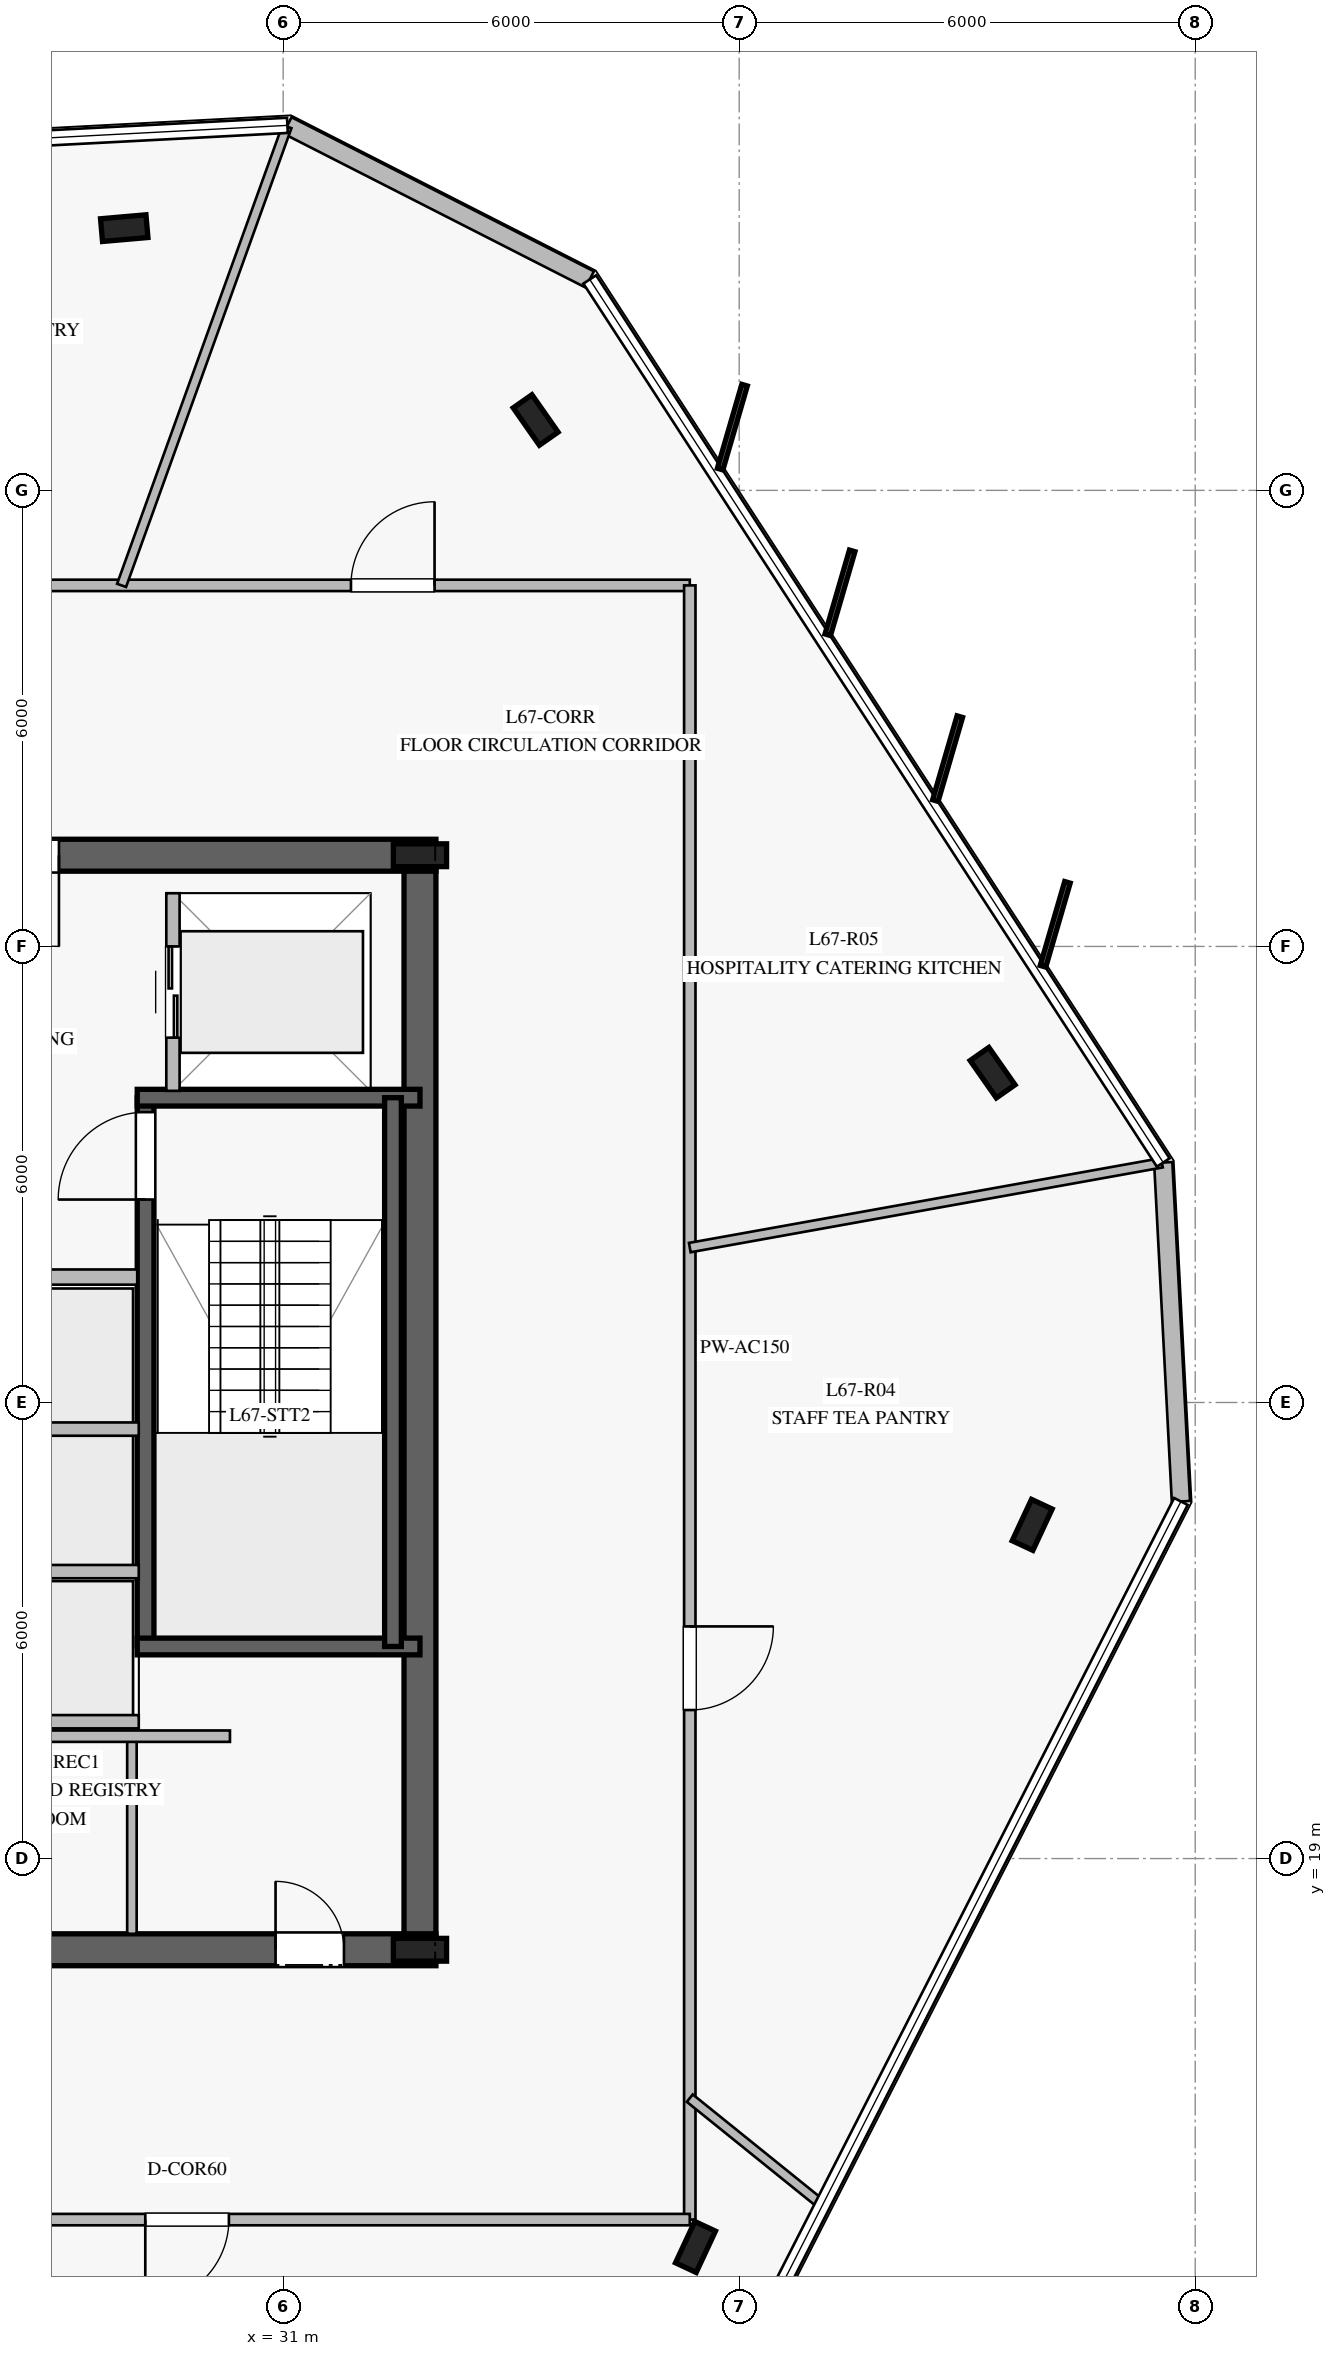
"""IFC4 building model, lengths in metres.
Left out: names, types, materials, properties, quantities, classifications, styles, units other than length and angle.
Written with IfcOpenShell. Run it as: python <this file> out.ifc"""

import sys

from ifc_helpers import new_model, si_unit, direction, frame, frame_2d, origin, origin_2d, place, context, subcontext, project, spatial, rectangle, i_section, extrude, element, fill, save


model = new_model("IFC4")
c1 = context("Model", 3, precision=1e-05, world=origin(), true_north=direction((0.0, 1.0)))
c2 = subcontext(c1, "Body", "Model", "MODEL_VIEW")
j1 = project(units=[si_unit("LENGTHUNIT", "METRE"), si_unit("PLANEANGLEUNIT", "RADIAN")], contexts=[c1])
p1 = place(None, origin())
s1 = spatial("IfcSite", under=j1, at=p1, CompositionType="ELEMENT")
p2 = place(p1, origin())
s2 = spatial("IfcBuilding", under=s1, at=p2, CompositionType="ELEMENT")
p3 = place(p2, frame((0.0, 0.0, 278.2)))
s3 = spatial("IfcBuildingStorey", under=s2, at=p3, CompositionType="ELEMENT", Elevation=278.2)
p4 = place(p3, frame((16.99, 17.8, 0.0), z_axis=(0.0, 0.0, 1.0), x_axis=(1.0, 0.0, 0.0)))
e1 = element("IfcWall", 1, at=p4, inside=s3, PredefinedType="SHEAR", context=c2, shape_type="SweptSolid", body=[
    extrude(rectangle(XDim=16.02, YDim=0.42, at=frame_2d((8.01, 0.0))), origin(), (0.0, 0.0, 1.0), 3.78),
])
p5 = place(p4, frame((4.96, 0.0, 0.0)))
e2 = element("IfcOpeningElement", 2, at=p5, cuts=e1, PredefinedType="OPENING", context=c2, shape_type="SweptSolid", body=[
    extrude(rectangle(XDim=1.2, YDim=2.25, at=frame_2d((0.6, 1.125))), frame((0.0, 0.22, 0.0), z_axis=(0.0, -1.0, 0.0), x_axis=(1.0, 0.0, 0.0)), (0.0, 0.0, 1.0), 0.44),
])
p6 = place(p4, frame((13.91, 0.0, 0.0)))
e3 = element("IfcOpeningElement", 3, at=p6, cuts=e1, PredefinedType="OPENING", context=c2, shape_type="SweptSolid", body=[
    extrude(rectangle(XDim=0.9, YDim=2.1, at=frame_2d((0.45, 1.05))), frame((0.0, 0.22, 0.0), z_axis=(0.0, -1.0, 0.0), x_axis=(1.0, 0.0, 0.0)), (0.0, 0.0, 1.0), 0.44),
])
p7 = place(p4, frame((9.16, 0.0, 0.0)))
e4 = element("IfcOpeningElement", 4, at=p7, cuts=e1, PredefinedType="OPENING", context=c2, shape_type="SweptSolid", body=[
    extrude(rectangle(XDim=1.1, YDim=2.2, at=frame_2d((0.55, 1.1))), frame((0.0, 0.22, 0.0), z_axis=(0.0, -1.0, 0.0), x_axis=(1.0, 0.0, 0.0)), (0.0, 0.0, 1.0), 0.44),
])
p8 = place(p3, frame((33.01, 32.2, 0.0), z_axis=(0.0, 0.0, 1.0), x_axis=(-1.0, 0.0, 0.0)))
e5 = element("IfcWall", 5, at=p8, inside=s3, PredefinedType="SHEAR", context=c2, shape_type="SweptSolid", body=[
    extrude(rectangle(XDim=16.02, YDim=0.42, at=frame_2d((8.01, 0.0))), origin(), (0.0, 0.0, 1.0), 3.78),
])
p9 = place(p8, frame((4.96, 0.0, 0.0)))
e6 = element("IfcOpeningElement", 6, at=p9, cuts=e5, PredefinedType="OPENING", context=c2, shape_type="SweptSolid", body=[
    extrude(rectangle(XDim=1.2, YDim=2.25, at=frame_2d((0.6, 1.125))), frame((0.0, 0.22, 0.0), z_axis=(0.0, -1.0, 0.0), x_axis=(1.0, 0.0, 0.0)), (0.0, 0.0, 1.0), 0.44),
])
p10 = place(p8, frame((9.785, 0.0, 0.0)))
e7 = element("IfcOpeningElement", 7, at=p10, cuts=e5, PredefinedType="OPENING", context=c2, shape_type="SweptSolid", body=[
    extrude(rectangle(XDim=1.1, YDim=2.2, at=frame_2d((0.55, 1.1))), frame((0.0, 0.22, 0.0), z_axis=(0.0, -1.0, 0.0), x_axis=(1.0, 0.0, 0.0)), (0.0, 0.0, 1.0), 0.44),
])
p11 = place(p3, frame((32.8, 18.01, 0.0), z_axis=(0.0, 0.0, 1.0), x_axis=(0.0, 1.0, 0.0)))
e8 = element("IfcWall", 8, at=p11, inside=s3, PredefinedType="SHEAR", context=c2, shape_type="SweptSolid", body=[
    extrude(rectangle(XDim=13.98, YDim=0.42, at=frame_2d((6.99, 0.0))), origin(), (0.0, 0.0, 1.0), 3.78),
])
for number, where, z_axis, x_axis in (
    (9, (32.8, 17.8, 0.0), (0.0, 0.0, 1.0), (1.0, 0.0, 0.0)),
    (10, (32.8, 32.2, 0.0), (0.0, 0.0, 1.0), (1.0, 0.0, 0.0)),
):
    element("IfcColumn", number, at=place(p3, frame(where, z_axis=z_axis, x_axis=x_axis)), inside=s3, PredefinedType="COLUMN", context=c2, shape_type="SweptSolid", body=[
        extrude(i_section(OverallWidth=0.3, OverallDepth=0.7, WebThickness=0.017, FlangeThickness=0.032, at=origin_2d()), origin(), (0.0, 0.0, 1.0), 4.0),
    ])
p12 = place(p3, frame((29.19, 21.79, 0.0), z_axis=(0.0, 0.0, 1.0), x_axis=(0.0, 1.0, 0.0)))
e11 = element("IfcWall", 11, at=p12, inside=s3, PredefinedType="SOLIDWALL", context=c2, shape_type="SweptSolid", body=[
    extrude(rectangle(XDim=7.22, YDim=0.22, at=frame_2d((3.61, 0.0))), origin(), (0.0, 0.0, 1.0), 3.78),
])
p13 = place(p12, frame((5.88, 0.0, 0.0)))
e12 = element("IfcOpeningElement", 12, at=p13, cuts=e11, PredefinedType="OPENING", context=c2, shape_type="SweptSolid", body=[
    extrude(rectangle(XDim=1.15, YDim=2.2, at=frame_2d((0.575, 1.1))), frame((0.0, 0.12, 0.0), z_axis=(0.0, -1.0, 0.0), x_axis=(1.0, 0.0, 0.0)), (0.0, 0.0, 1.0), 0.24),
])
for number, where, z_axis, x_axis in (
    (13, (29.08, 21.79, 0.0), (0.0, 0.0, 1.0), (1.0, 0.0, 0.0)),
    (14, (29.08, 29.01, 0.0), (0.0, 0.0, 1.0), (1.0, 0.0, 0.0)),
):
    element("IfcWall", number, at=place(p3, frame(where, z_axis=z_axis, x_axis=x_axis)), inside=s3, PredefinedType="SOLIDWALL", context=c2, shape_type="SweptSolid", body=[
        extrude(rectangle(XDim=3.72, YDim=0.22, at=frame_2d((1.86, 0.0))), origin(), (0.0, 0.0, 1.0), 3.78),
    ])
p14 = place(p3, frame((32.445, 29.01, 0.0), z_axis=(0.0, 0.0, 1.0), x_axis=(0.0, -1.0, 0.0)))
e15 = element("IfcWall", 15, at=p14, inside=s3, PredefinedType="SOLIDWALL", context=c2, shape_type="SweptSolid", body=[
    extrude(rectangle(XDim=7.22, YDim=0.22, at=frame_2d((3.61, 0.0))), origin(), (0.0, 0.0, 1.0), 3.78),
])
for number, where, z_axis, x_axis in (
    (16, (28.909, 40.45, 0.0), (0.0, 0.0, 1.0), (0.996, 0.087, 0.0)),
    (17, (36.425, 13.89, 0.0), (0.0, 0.0, 1.0), (0.423, 0.906, 0.0)),
    (18, (40.855, 23.39, 0.0), (0.0, 0.0, 1.0), (0.423, 0.906, 0.0)),
    (19, (40.334, 29.339, 0.0), (0.0, 0.0, 1.0), (-0.574, 0.819, 0.0)),
    (20, (34.322, 37.926, 0.0), (0.0, 0.0, 1.0), (-0.574, 0.819, 0.0)),
):
    element("IfcColumn", number, at=place(p3, frame(where, z_axis=z_axis, x_axis=x_axis)), inside=s3, PredefinedType="COLUMN", context=c2, shape_type="SweptSolid", body=[
        extrude(i_section(OverallWidth=0.3, OverallDepth=0.6, WebThickness=0.015, FlangeThickness=0.03, at=origin_2d()), origin(), (0.0, 0.0, 1.0), 4.0),
    ])
p15 = place(p3, frame((42.812, 23.698, 0.0), z_axis=(0.0, 0.0, 1.0), x_axis=(-0.052162791258, 0.998638594892, 0.0)))
e21 = element("IfcWall", 21, at=p15, inside=s3, PredefinedType="STANDARD", context=c2, shape_type="SweptSolid", body=[
    extrude(rectangle(XDim=4.465, YDim=0.24, at=frame_2d((2.232, 0.0))), origin(), (0.0, 0.0, 1.0), 3.78),
])
p16 = place(p3, frame((35.034, 39.775, 0.0), z_axis=(0.0, 0.0, 1.0), x_axis=(-0.890988997793, 0.454024895586, 0.0)))
e22 = element("IfcWall", 22, at=p16, inside=s3, PredefinedType="STANDARD", context=c2, shape_type="SweptSolid", body=[
    extrude(rectangle(XDim=4.465, YDim=0.24, at=frame_2d((2.232, 0.0))), origin(), (0.0, 0.0, 1.0), 3.78),
])
p17 = place(p3, frame((25.7, 26.65, 0.0), z_axis=(0.0, 0.0, 1.0), x_axis=(1.0, 0.0, 0.0)))
e23 = element("IfcWall", 23, at=p17, inside=s3, PredefinedType="PARTITIONING", context=c2, shape_type="SweptSolid", body=[
    extrude(rectangle(XDim=3.38, YDim=0.2, at=frame_2d((1.69, 0.0))), origin(), (0.0, 0.0, 1.0), 3.78),
])
p18 = place(p3, frame((29.01, 18.01, 0.0), z_axis=(0.0, 0.0, 1.0), x_axis=(0.0, 1.0, 0.0)))
e24 = element("IfcWall", 24, at=p18, inside=s3, PredefinedType="PARTITIONING", context=c2, shape_type="SweptSolid", body=[
    extrude(rectangle(XDim=2.54, YDim=0.125, at=frame_2d((1.27, 0.0))), origin(), (0.0, 0.0, 1.0), 3.78),
])
p19 = place(p3, frame((24.4, 20.61, 0.0), z_axis=(0.0, 0.0, 1.0), x_axis=(1.0, 0.0, 0.0)))
e25 = element("IfcWall", 25, at=p19, inside=s3, PredefinedType="PARTITIONING", context=c2, shape_type="SweptSolid", body=[
    extrude(rectangle(XDim=5.9, YDim=0.15, at=frame_2d((2.95, 0.0))), origin(), (0.0, 0.0, 1.0), 3.78),
])
for number, where, z_axis, x_axis in (
    (26, (26.75, 20.8, 0.0), (0.0, 0.0, 1.0), (1.0, 0.0, 0.0)),
    (27, (26.75, 22.775, 0.0), (0.0, 0.0, 1.0), (1.0, 0.0, 0.0)),
    (28, (26.75, 24.65, 0.0), (0.0, 0.0, 1.0), (1.0, 0.0, 0.0)),
):
    element("IfcWall", number, at=place(p3, frame(where, z_axis=z_axis, x_axis=x_axis)), inside=s3, PredefinedType="PARTITIONING", context=c2, shape_type="SweptSolid", body=[
        extrude(rectangle(XDim=2.35, YDim=0.175, at=frame_2d((1.175, 0.0))), origin(), (0.0, 0.0, 1.0), 3.78),
    ])
p20 = place(p3, frame((29.55, 29.1, 0.0), z_axis=(0.0, 0.0, 1.0), x_axis=(0.0, 1.0, 0.0)))
e29 = element("IfcWall", 29, at=p20, inside=s3, PredefinedType="PARTITIONING", context=c2, shape_type="SweptSolid", body=[
    extrude(rectangle(XDim=2.6, YDim=0.175, at=frame_2d((1.3, 0.0))), origin(), (0.0, 0.0, 1.0), 3.78),
])
p21 = place(p20, frame((0.7, 0.0, 0.0)))
e30 = element("IfcOpeningElement", 30, at=p21, cuts=e29, PredefinedType="OPENING", context=c2, shape_type="SweptSolid", body=[
    extrude(rectangle(XDim=1.2, YDim=2.2, at=frame_2d((0.6, 1.1))), frame((0.0, 0.098, 0.0), z_axis=(0.0, -1.0, 0.0), x_axis=(1.0, 0.0, 0.0)), (0.0, 0.0, 1.0), 0.195),
])
p22 = place(p3, frame((13.65, 35.75, 0.0), z_axis=(0.0, 0.0, 1.0), x_axis=(1.0, 0.0, 0.0)))
e31 = element("IfcWall", 31, at=p22, inside=s3, PredefinedType="PARTITIONING", context=c2, shape_type="SweptSolid", body=[
    extrude(rectangle(XDim=22.7, YDim=0.15, at=frame_2d((11.35, 0.0))), origin(), (0.0, 0.0, 1.0), 3.05),
])
p23 = place(p22, frame((18.242, 0.0, 0.0)))
e32 = element("IfcOpeningElement", 32, at=p23, cuts=e31, PredefinedType="OPENING", context=c2, shape_type="SweptSolid", body=[
    extrude(rectangle(XDim=1.1, YDim=2.2, at=frame_2d((0.55, 1.1))), frame((0.0, 0.085, 0.0), z_axis=(0.0, -1.0, 0.0), x_axis=(1.0, 0.0, 0.0)), (0.0, 0.0, 1.0), 0.17),
])
p24 = place(p22, frame((11.312, 0.0, 0.0)))
e33 = element("IfcOpeningElement", 33, at=p24, cuts=e31, PredefinedType="OPENING", context=c2, shape_type="SweptSolid", body=[
    extrude(rectangle(XDim=1.1, YDim=2.2, at=frame_2d((0.55, 1.1))), frame((0.0, 0.085, 0.0), z_axis=(0.0, -1.0, 0.0), x_axis=(1.0, 0.0, 0.0)), (0.0, 0.0, 1.0), 0.17),
])
p25 = place(p22, frame((3.871, 0.0, 0.0)))
e34 = element("IfcOpeningElement", 34, at=p25, cuts=e31, PredefinedType="OPENING", context=c2, shape_type="SweptSolid", body=[
    extrude(rectangle(XDim=1.1, YDim=2.2, at=frame_2d((0.55, 1.1))), frame((0.0, 0.085, 0.0), z_axis=(0.0, -1.0, 0.0), x_axis=(1.0, 0.0, 0.0)), (0.0, 0.0, 1.0), 0.17),
])
p26 = place(p3, frame((36.35, 35.75, 0.0), z_axis=(0.0, 0.0, 1.0), x_axis=(0.0, -1.0, 0.0)))
e35 = element("IfcWall", 35, at=p26, inside=s3, PredefinedType="PARTITIONING", context=c2, shape_type="SweptSolid", body=[
    extrude(rectangle(XDim=21.5, YDim=0.15, at=frame_2d((10.75, 0.0))), origin(), (0.0, 0.0, 1.0), 3.28),
])
p27 = place(p26, frame((13.696, 0.0, 0.0)))
e36 = element("IfcOpeningElement", 36, at=p27, cuts=e35, PredefinedType="OPENING", context=c2, shape_type="SweptSolid", body=[
    extrude(rectangle(XDim=1.1, YDim=2.2, at=frame_2d((0.55, 1.1))), frame((0.0, 0.085, 0.0), z_axis=(0.0, -1.0, 0.0), x_axis=(1.0, 0.0, 0.0)), (0.0, 0.0, 1.0), 0.17),
])
p28 = place(p3, frame((36.35, 14.25, 0.0), z_axis=(0.0, 0.0, 1.0), x_axis=(-1.0, 0.0, 0.0)))
e37 = element("IfcWall", 37, at=p28, inside=s3, PredefinedType="PARTITIONING", context=c2, shape_type="SweptSolid", body=[
    extrude(rectangle(XDim=22.7, YDim=0.15, at=frame_2d((11.35, 0.0))), origin(), (0.0, 0.0, 1.0), 3.05),
])
p29 = place(p28, frame((17.137, 0.0, 0.0)))
e38 = element("IfcOpeningElement", 38, at=p29, cuts=e37, PredefinedType="OPENING", context=c2, shape_type="SweptSolid", body=[
    extrude(rectangle(XDim=1.1, YDim=2.2, at=frame_2d((0.55, 1.1))), frame((0.0, 0.085, 0.0), z_axis=(0.0, -1.0, 0.0), x_axis=(1.0, 0.0, 0.0)), (0.0, 0.0, 1.0), 0.17),
])
p30 = place(p28, frame((6.064, 0.0, 0.0)))
e39 = element("IfcOpeningElement", 39, at=p30, cuts=e37, PredefinedType="OPENING", context=c2, shape_type="SweptSolid", body=[
    extrude(rectangle(XDim=1.1, YDim=2.2, at=frame_2d((0.55, 1.1))), frame((0.0, 0.085, 0.0), z_axis=(0.0, -1.0, 0.0), x_axis=(1.0, 0.0, 0.0)), (0.0, 0.0, 1.0), 0.17),
])
p31 = place(p3, frame((36.35, 15.848, 0.0), z_axis=(0.0, 0.0, 1.0), x_axis=(0.778316237, -0.627872467323, 0.0)))
e40 = element("IfcWall", 40, at=p31, inside=s3, PredefinedType="PARTITIONING", context=c2, shape_type="SweptSolid", body=[
    extrude(rectangle(XDim=2.227, YDim=0.125, at=frame_2d((1.113, 0.0))), origin(), (0.0, 0.0, 1.0), 3.28),
])
p32 = place(p3, frame((36.35, 27.038, 0.0), z_axis=(0.0, 0.0, 1.0), x_axis=(0.98424342704, 0.1768187669, 0.0)))
e41 = element("IfcWall", 41, at=p32, inside=s3, PredefinedType="PARTITIONING", context=c2, shape_type="SweptSolid", body=[
    extrude(rectangle(XDim=6.311, YDim=0.125, at=frame_2d((3.156, 0.0))), origin(), (0.0, 0.0, 1.0), 3.28),
])
p33 = place(p3, frame((28.874, 35.75, 0.0), z_axis=(0.0, 0.0, 1.0), x_axis=(0.3391479103, 0.940733062531, 0.0)))
e42 = element("IfcWall", 42, at=p33, inside=s3, PredefinedType="PARTITIONING", context=c2, shape_type="SweptSolid", body=[
    extrude(rectangle(XDim=6.416, YDim=0.125, at=frame_2d((3.208, 0.0))), origin(), (0.0, 0.0, 1.0), 3.05),
])
p34 = place(p13, origin())
e43 = element("IfcDoor", 43, at=p34, inside=s3, OperationType="SINGLE_SWING_LEFT", PredefinedType="DOOR", context=c2, shape_type="SweptSolid", body=[
    extrude(rectangle(XDim=1.15, YDim=2.2, at=frame_2d((0.575, 1.1))), frame((0.0, 0.025, 0.0), z_axis=(0.0, -1.0, 0.0), x_axis=(1.0, 0.0, 0.0)), (0.0, 0.0, 1.0), 0.05),
])
fill(e12, e43)
p35 = place(p9, origin())
e44 = element("IfcDoor", 44, at=p35, inside=s3, OperationType="SINGLE_SWING_LEFT", PredefinedType="DOOR", context=c2, shape_type="SweptSolid", body=[
    extrude(rectangle(XDim=1.2, YDim=2.25, at=frame_2d((0.6, 1.125))), frame((0.0, 0.025, 0.0), z_axis=(0.0, -1.0, 0.0), x_axis=(1.0, 0.0, 0.0)), (0.0, 0.0, 1.0), 0.05),
])
fill(e6, e44)
p36 = place(p6, origin())
e45 = element("IfcDoor", 45, at=p36, inside=s3, OperationType="SINGLE_SWING_LEFT", PredefinedType="DOOR", context=c2, shape_type="SweptSolid", body=[
    extrude(rectangle(XDim=0.9, YDim=2.1, at=frame_2d((0.45, 1.05))), frame((0.0, 0.025, 0.0), z_axis=(0.0, -1.0, 0.0), x_axis=(1.0, 0.0, 0.0)), (0.0, 0.0, 1.0), 0.05),
])
fill(e3, e45)
p37 = place(p21, origin())
e46 = element("IfcDoor", 46, at=p37, inside=s3, OperationType="DOUBLE_DOOR_SLIDING", PredefinedType="DOOR", context=c2, shape_type="SweptSolid", body=[
    extrude(rectangle(XDim=1.2, YDim=2.2, at=frame_2d((0.6, 1.1))), frame((0.0, 0.025, 0.0), z_axis=(0.0, -1.0, 0.0), x_axis=(1.0, 0.0, 0.0)), (0.0, 0.0, 1.0), 0.05),
])
fill(e30, e46)
p38 = place(p30, origin())
e47 = element("IfcDoor", 47, at=p38, inside=s3, OperationType="SINGLE_SWING_RIGHT", PredefinedType="DOOR", context=c2, shape_type="SweptSolid", body=[
    extrude(rectangle(XDim=1.1, YDim=2.2, at=frame_2d((0.55, 1.1))), frame((0.0, 0.025, 0.0), z_axis=(0.0, -1.0, 0.0), x_axis=(1.0, 0.0, 0.0)), (0.0, 0.0, 1.0), 0.05),
])
fill(e39, e47)
p39 = place(p27, origin())
e48 = element("IfcDoor", 48, at=p39, inside=s3, OperationType="SINGLE_SWING_LEFT", PredefinedType="DOOR", context=c2, shape_type="SweptSolid", body=[
    extrude(rectangle(XDim=1.1, YDim=2.2, at=frame_2d((0.55, 1.1))), frame((0.0, 0.025, 0.0), z_axis=(0.0, -1.0, 0.0), x_axis=(1.0, 0.0, 0.0)), (0.0, 0.0, 1.0), 0.05),
])
fill(e36, e48)
p40 = place(p23, origin())
e49 = element("IfcDoor", 49, at=p40, inside=s3, OperationType="SINGLE_SWING_RIGHT", PredefinedType="DOOR", context=c2, shape_type="SweptSolid", body=[
    extrude(rectangle(XDim=1.1, YDim=2.2, at=frame_2d((0.55, 1.1))), frame((0.0, 0.025, 0.0), z_axis=(0.0, -1.0, 0.0), x_axis=(1.0, 0.0, 0.0)), (0.0, 0.0, 1.0), 0.05),
])
fill(e32, e49)
save(model, sys.argv[1])
